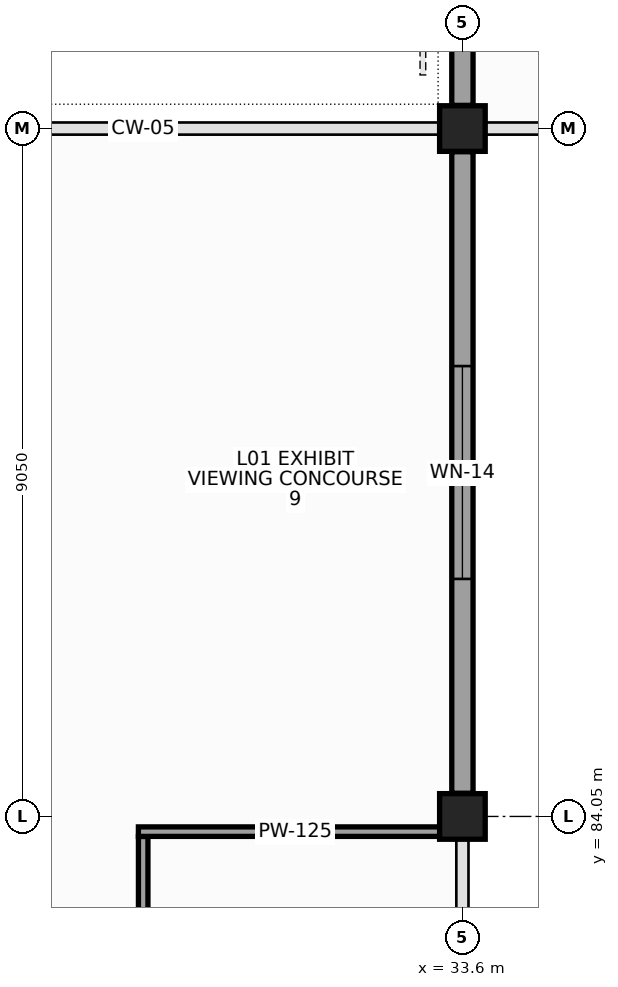
"""IFC4 building model, lengths in metres.
Left out: names, types, materials, properties, quantities, classifications, styles, units other than length and angle.
Written with IfcOpenShell. Run it as: python <this file> out.ifc"""

import sys

from ifc_helpers import new_model, si_unit, direction, frame, frame_2d, origin, origin_2d, place, context, subcontext, project, spatial, rectangle, extrude, element, fill, save


model = new_model("IFC4")
c1 = context("Model", 3, precision=1e-05, world=origin(), true_north=direction((0.0, 1.0)))
c2 = subcontext(c1, "Body", "Model", "MODEL_VIEW")
j1 = project(units=[si_unit("LENGTHUNIT", "METRE"), si_unit("PLANEANGLEUNIT", "RADIAN")], contexts=[c1])
p1 = place(None, origin())
s1 = spatial("IfcSite", under=j1, at=p1, CompositionType="ELEMENT")
p2 = place(p1, origin())
s2 = spatial("IfcBuilding", under=s1, at=p2, CompositionType="ELEMENT")
p3 = place(p2, frame((0.0, 0.0, 5.4)))
s3 = spatial("IfcBuildingStorey", under=s2, at=p3, CompositionType="ELEMENT", Elevation=5.4)
for number, where, z_axis, x_axis in (
    (1, (33.6, 84.05, 0.0), (0.0, 0.0, 1.0), (1.0, 0.0, 0.0)),
    (2, (33.6, 93.1, 0.0), (0.0, 0.0, 1.0), (1.0, 0.0, 0.0)),
):
    element("IfcColumn", number, at=place(p3, frame(where, z_axis=z_axis, x_axis=x_axis)), inside=s3, PredefinedType="COLUMN", context=c2, shape_type="SweptSolid", body=[
        extrude(rectangle(XDim=0.6, YDim=0.6, at=origin_2d()), origin(), (0.0, 0.0, 1.0), 5.4),
    ])
p4 = place(p3, frame((33.6, 101.845, 0.0), z_axis=(0.0, 0.0, 1.0), x_axis=(0.0, -1.0, 0.0)))
e3 = element("IfcWall", 3, at=p4, inside=s3, PredefinedType="STANDARD", context=c2, shape_type="SweptSolid", body=[
    extrude(rectangle(XDim=8.44, YDim=0.28, at=frame_2d((4.22, 0.0))), origin(), (0.0, 0.0, 1.0), 4.25),
])
p5 = place(p4, frame((2.72, 0.0, 0.95)))
e4 = element("IfcOpeningElement", 4, at=p5, cuts=e3, PredefinedType="OPENING", context=c2, shape_type="SweptSolid", body=[
    extrude(rectangle(XDim=3.0, YDim=1.8, at=frame_2d((1.5, 0.9))), frame((0.0, 0.15, 0.0), z_axis=(0.0, -1.0, 0.0), x_axis=(1.0, 0.0, 0.0)), (0.0, 0.0, 1.0), 0.3),
])
p6 = place(p3, frame((33.6, 84.355, 0.0), z_axis=(0.0, 0.0, 1.0), x_axis=(0.0, 1.0, 0.0)))
e5 = element("IfcWall", 5, at=p6, inside=s3, PredefinedType="STANDARD", context=c2, shape_type="SweptSolid", body=[
    extrude(rectangle(XDim=8.44, YDim=0.28, at=frame_2d((4.22, 0.0))), origin(), (0.0, 0.0, 1.0), 4.25),
])
p7 = place(p6, frame((2.82, 0.0, 0.95)))
e6 = element("IfcOpeningElement", 6, at=p7, cuts=e5, PredefinedType="OPENING", context=c2, shape_type="SweptSolid", body=[
    extrude(rectangle(XDim=2.8, YDim=2.2, at=frame_2d((1.4, 1.1))), frame((0.0, 0.15, 0.0), z_axis=(0.0, -1.0, 0.0), x_axis=(1.0, 0.0, 0.0)), (0.0, 0.0, 1.0), 0.3),
])
p8 = place(p3, frame((29.4, 57.163, 0.0), z_axis=(0.0, 0.0, 1.0), x_axis=(0.0, 1.0, 0.0)))
e7 = element("IfcWall", 7, at=p8, inside=s3, PredefinedType="PARTITIONING", context=c2, shape_type="SweptSolid", body=[
    extrude(rectangle(XDim=26.624, YDim=0.125, at=frame_2d((13.312, 0.0))), origin(), (0.0, 0.0, 1.0), 4.23),
])
p9 = place(p8, frame((12.822, 0.0, 0.0)))
e8 = element("IfcOpeningElement", 8, at=p9, cuts=e7, PredefinedType="OPENING", context=c2, shape_type="SweptSolid", body=[
    extrude(rectangle(XDim=0.98, YDim=2.22, at=frame_2d((0.49, 1.11))), frame((0.0, 0.073, 0.0), z_axis=(0.0, -1.0, 0.0), x_axis=(1.0, 0.0, 0.0)), (0.0, 0.0, 1.0), 0.145),
])
p10 = place(p8, frame((14.402, 0.0, 1.05)))
e9 = element("IfcOpeningElement", 9, at=p10, cuts=e7, PredefinedType="OPENING", context=c2, shape_type="SweptSolid", body=[
    extrude(rectangle(XDim=3.3, YDim=1.35, at=frame_2d((1.65, 0.675))), frame((0.0, 0.073, 0.0), z_axis=(0.0, -1.0, 0.0), x_axis=(1.0, 0.0, 0.0)), (0.0, 0.0, 1.0), 0.145),
])
p11 = place(p3, frame((29.337, 83.85, 0.0), z_axis=(0.0, 0.0, 1.0), x_axis=(1.0, 0.0, 0.0)))
e10 = element("IfcWall", 10, at=p11, inside=s3, PredefinedType="PARTITIONING", context=c2, shape_type="SweptSolid", body=[
    extrude(rectangle(XDim=4.125, YDim=0.125, at=frame_2d((2.062, 0.0))), origin(), (0.0, 0.0, 1.0), 2.622),
])
p12 = place(p7, origin())
e11 = element("IfcWindow", 11, at=p12, inside=s3, PartitioningType="SINGLE_PANEL", PredefinedType="WINDOW", context=c2, shape_type="SweptSolid", body=[
    extrude(rectangle(XDim=2.8, YDim=2.2, at=frame_2d((1.4, 1.1))), frame((0.0, 0.03, 0.0), z_axis=(0.0, -1.0, 0.0), x_axis=(1.0, 0.0, 0.0)), (0.0, 0.0, 1.0), 0.06),
])
fill(e6, e11)
save(model, sys.argv[1])
